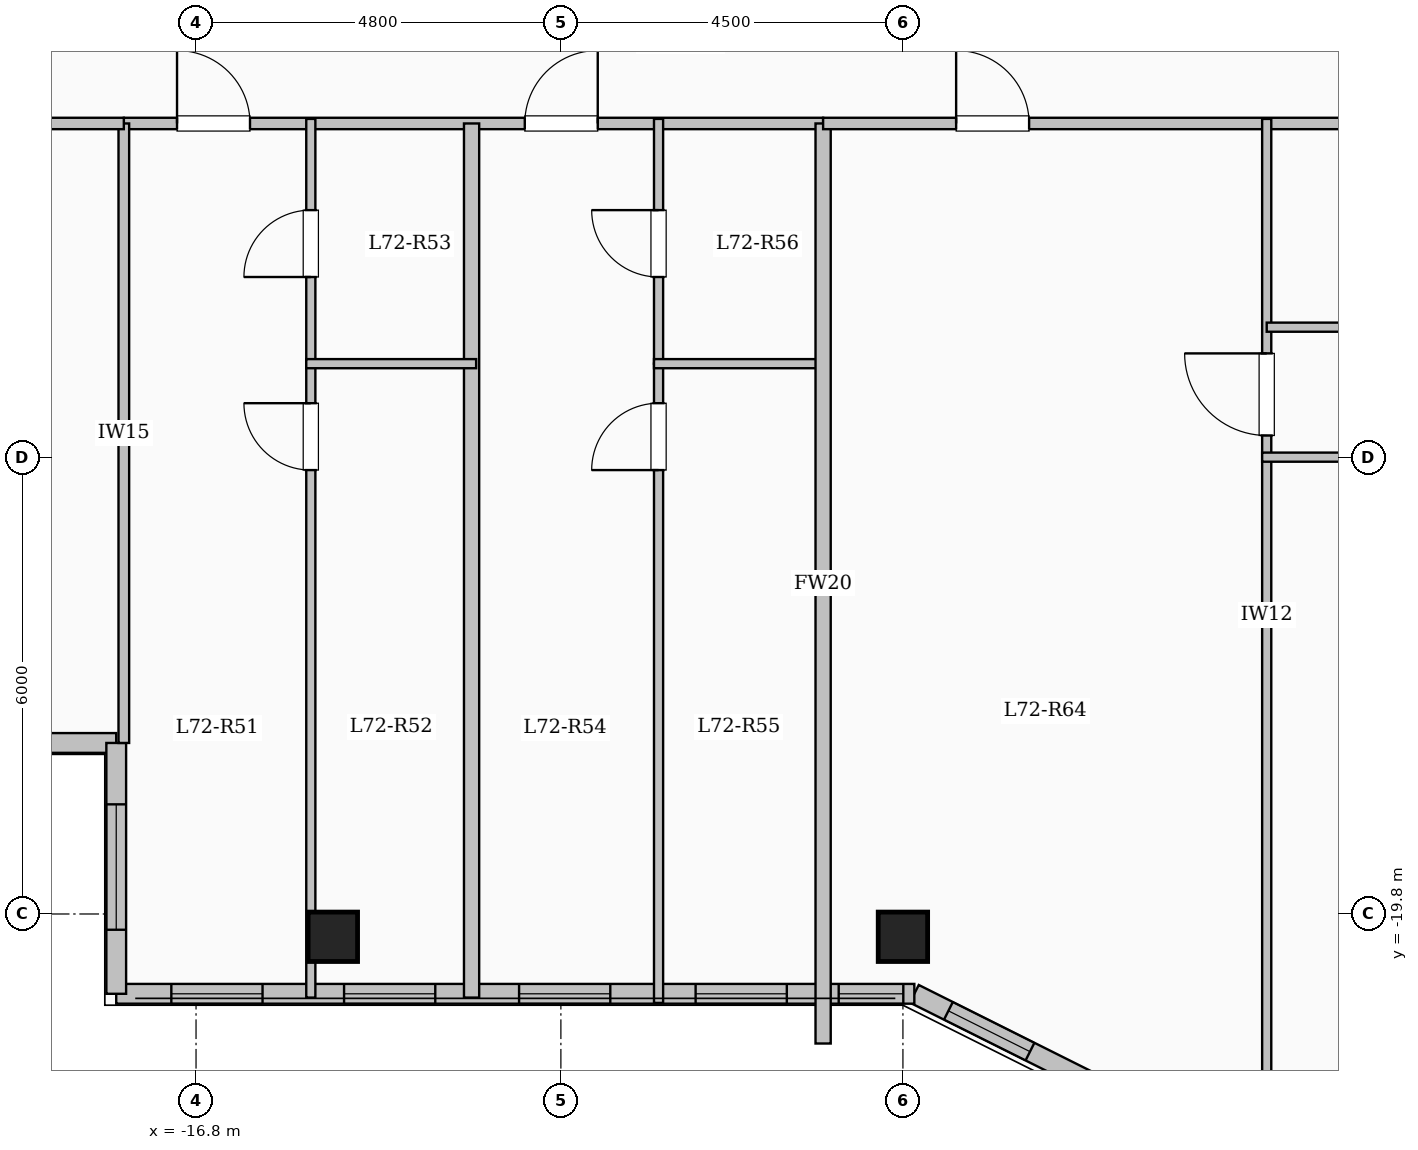
"""IFC4 building model, lengths in metres.
Left out: names, types, materials, properties, quantities, classifications, styles, units other than length and angle.
Written with IfcOpenShell. Run it as: python <this file> out.ifc"""

import sys

from ifc_helpers import new_model, si_unit, direction, frame, frame_2d, origin, origin_2d, place, context, subcontext, project, spatial, rectangle, extrude, element, fill, save


model = new_model("IFC4")
c1 = context("Model", 3, precision=1e-05, world=origin(), true_north=direction((0.0, 1.0)))
c2 = subcontext(c1, "Body", "Model", "MODEL_VIEW")
j1 = project(units=[si_unit("LENGTHUNIT", "METRE"), si_unit("PLANEANGLEUNIT", "RADIAN")], contexts=[c1])
p1 = place(None, origin())
s1 = spatial("IfcSite", under=j1, at=p1, CompositionType="ELEMENT")
p2 = place(p1, origin())
s2 = spatial("IfcBuilding", under=s1, at=p2, CompositionType="ELEMENT")
p3 = place(p2, frame((0.0, 0.0, 264.95)))
s3 = spatial("IfcBuildingStorey", under=s2, at=p3, CompositionType="ELEMENT", Elevation=264.95)
for number, where, z_axis, x_axis in (
    (1, (-15.0, -20.1, 0.0), (0.0, 0.0, 1.0), (1.0, 0.0, 0.0)),
    (2, (-7.5, -20.1, 0.0), (0.0, 0.0, 1.0), (1.0, 0.0, 0.0)),
):
    element("IfcColumn", number, at=place(p3, frame(where, z_axis=z_axis, x_axis=x_axis)), inside=s3, PredefinedType="COLUMN", context=c2, shape_type="SweptSolid", body=[
        extrude(rectangle(XDim=0.65, YDim=0.65, at=origin_2d()), origin(), (0.0, 0.0, 1.0), 3.35),
    ])
p4 = place(p3, frame((-17.85, -17.55, 0.0), z_axis=(0.0, 0.0, 1.0), x_axis=(-1.0, 0.0, 0.0)))
e3 = element("IfcWall", 3, at=p4, inside=s3, PredefinedType="SOLIDWALL", context=c2, shape_type="SweptSolid", body=[
    extrude(rectangle(XDim=4.8, YDim=0.26, at=frame_2d((2.4, 0.0))), origin(), (0.0, 0.0, 1.0), 3.1),
])
p5 = place(p4, frame((1.275, 0.0, 0.9)))
e4 = element("IfcOpeningElement", 4, at=p5, cuts=e3, PredefinedType="OPENING", context=c2, shape_type="SweptSolid", body=[
    extrude(rectangle(XDim=2.2, YDim=1.75, at=frame_2d((1.1, 0.875))), frame((0.0, 0.14, 0.0), z_axis=(0.0, -1.0, 0.0), x_axis=(1.0, 0.0, 0.0)), (0.0, 0.0, 1.0), 0.28),
])
p6 = place(p3, frame((-4.35, -22.35, 0.0), z_axis=(0.0, 0.0, 1.0), x_axis=(-0.894427191, 0.4472135955, 0.0)))
e5 = element("IfcWall", 5, at=p6, inside=s3, PredefinedType="SOLIDWALL", context=c2, shape_type="SweptSolid", body=[
    extrude(rectangle(XDim=3.354, YDim=0.26, at=frame_2d((1.677, 0.0))), origin(), (0.0, 0.0, 1.0), 3.1),
])
p7 = place(p6, frame((1.653, 0.0, 0.95)))
e6 = element("IfcOpeningElement", 6, at=p7, cuts=e5, PredefinedType="OPENING", context=c2, shape_type="SweptSolid", body=[
    extrude(rectangle(XDim=1.2, YDim=1.5, at=frame_2d((0.6, 0.75))), frame((0.0, 0.14, 0.0), z_axis=(0.0, -1.0, 0.0), x_axis=(1.0, 0.0, 0.0)), (0.0, 0.0, 1.0), 0.28),
])
p8 = place(p3, frame((-7.35, -20.85, 0.0), z_axis=(0.0, 0.0, 1.0), x_axis=(-1.0, 0.0, 0.0)))
e7 = element("IfcWall", 7, at=p8, inside=s3, PredefinedType="SOLIDWALL", context=c2, shape_type="SweptSolid", body=[
    extrude(rectangle(XDim=10.5, YDim=0.26, at=frame_2d((5.25, 0.0))), origin(), (0.0, 0.0, 1.0), 3.1),
])
p9 = place(p8, frame((0.145, 0.0, 0.95)))
e8 = element("IfcOpeningElement", 8, at=p9, cuts=e7, PredefinedType="OPENING", context=c2, shape_type="SweptSolid", body=[
    extrude(rectangle(XDim=0.85, YDim=1.5, at=frame_2d((0.425, 0.75))), frame((0.0, 0.14, 0.0), z_axis=(0.0, -1.0, 0.0), x_axis=(1.0, 0.0, 0.0)), (0.0, 0.0, 1.0), 0.28),
])
p10 = place(p8, frame((1.677, 0.0, 0.95)))
e9 = element("IfcOpeningElement", 9, at=p10, cuts=e7, PredefinedType="OPENING", context=c2, shape_type="SweptSolid", body=[
    extrude(rectangle(XDim=1.2, YDim=1.5, at=frame_2d((0.6, 0.75))), frame((0.0, 0.14, 0.0), z_axis=(0.0, -1.0, 0.0), x_axis=(1.0, 0.0, 0.0)), (0.0, 0.0, 1.0), 0.28),
])
p11 = place(p8, frame((4.0, 0.0, 0.95)))
e10 = element("IfcOpeningElement", 10, at=p11, cuts=e7, PredefinedType="OPENING", context=c2, shape_type="SweptSolid", body=[
    extrude(rectangle(XDim=1.2, YDim=1.5, at=frame_2d((0.6, 0.75))), frame((0.0, 0.14, 0.0), z_axis=(0.0, -1.0, 0.0), x_axis=(1.0, 0.0, 0.0)), (0.0, 0.0, 1.0), 0.28),
])
p12 = place(p8, frame((6.302, 0.0, 0.95)))
e11 = element("IfcOpeningElement", 11, at=p12, cuts=e7, PredefinedType="OPENING", context=c2, shape_type="SweptSolid", body=[
    extrude(rectangle(XDim=1.2, YDim=1.5, at=frame_2d((0.6, 0.75))), frame((0.0, 0.14, 0.0), z_axis=(0.0, -1.0, 0.0), x_axis=(1.0, 0.0, 0.0)), (0.0, 0.0, 1.0), 0.28),
])
p13 = place(p8, frame((8.575, 0.0, 0.95)))
e12 = element("IfcOpeningElement", 12, at=p13, cuts=e7, PredefinedType="OPENING", context=c2, shape_type="SweptSolid", body=[
    extrude(rectangle(XDim=1.2, YDim=1.5, at=frame_2d((0.6, 0.75))), frame((0.0, 0.14, 0.0), z_axis=(0.0, -1.0, 0.0), x_axis=(1.0, 0.0, 0.0)), (0.0, 0.0, 1.0), 0.28),
])
p14 = place(p3, frame((-17.85, -20.85, 0.0), z_axis=(0.0, 0.0, 1.0), x_axis=(0.0, 1.0, 0.0)))
e13 = element("IfcWall", 13, at=p14, inside=s3, PredefinedType="SOLIDWALL", context=c2, shape_type="SweptSolid", body=[
    extrude(rectangle(XDim=3.3, YDim=0.26, at=frame_2d((1.65, 0.0))), origin(), (0.0, 0.0, 1.0), 3.1),
])
p15 = place(p14, frame((0.843, 0.0, 0.9)))
e14 = element("IfcOpeningElement", 14, at=p15, cuts=e13, PredefinedType="OPENING", context=c2, shape_type="SweptSolid", body=[
    extrude(rectangle(XDim=1.65, YDim=1.6, at=frame_2d((0.825, 0.8))), frame((0.0, 0.14, 0.0), z_axis=(0.0, -1.0, 0.0), x_axis=(1.0, 0.0, 0.0)), (0.0, 0.0, 1.0), 0.28),
])
p16 = place(p3, frame((-17.75, -9.4, 0.0), z_axis=(0.0, 0.0, 1.0), x_axis=(1.0, 0.0, 0.0)))
e15 = element("IfcWall", 15, at=p16, inside=s3, PredefinedType="PARTITIONING", context=c2, shape_type="SweptSolid", body=[
    extrude(rectangle(XDim=9.2, YDim=0.15, at=frame_2d((4.6, 0.0))), origin(), (0.0, 0.0, 1.0), 3.1),
])
p17 = place(p16, frame((0.7, 0.0, 0.0)))
e16 = element("IfcOpeningElement", 16, at=p17, cuts=e15, PredefinedType="OPENING", context=c2, shape_type="SweptSolid", body=[
    extrude(rectangle(XDim=0.96, YDim=2.15, at=frame_2d((0.48, 1.075))), frame((0.0, 0.085, 0.0), z_axis=(0.0, -1.0, 0.0), x_axis=(1.0, 0.0, 0.0)), (0.0, 0.0, 1.0), 0.17),
])
p18 = place(p16, frame((5.275, 0.0, 0.0)))
e17 = element("IfcOpeningElement", 17, at=p18, cuts=e15, PredefinedType="OPENING", context=c2, shape_type="SweptSolid", body=[
    extrude(rectangle(XDim=0.96, YDim=2.15, at=frame_2d((0.48, 1.075))), frame((0.0, 0.085, 0.0), z_axis=(0.0, -1.0, 0.0), x_axis=(1.0, 0.0, 0.0)), (0.0, 0.0, 1.0), 0.17),
])
p19 = place(p3, frame((-13.175, -20.9, 0.0), z_axis=(0.0, 0.0, 1.0), x_axis=(0.0, 1.0, 0.0)))
e18 = element("IfcWall", 18, at=p19, inside=s3, PredefinedType="SOLIDWALL", context=c2, shape_type="SweptSolid", body=[
    extrude(rectangle(XDim=11.5, YDim=0.2, at=frame_2d((5.75, 0.0))), origin(), (0.0, 0.0, 1.0), 3.1),
])
p20 = place(p3, frame((-15.29, -20.9, 0.0), z_axis=(0.0, 0.0, 1.0), x_axis=(0.0, 1.0, 0.0)))
e19 = element("IfcWall", 19, at=p20, inside=s3, PredefinedType="PARTITIONING", context=c2, shape_type="SweptSolid", body=[
    extrude(rectangle(XDim=8.34, YDim=0.12, at=frame_2d((4.17, 0.0))), origin(), (0.0, 0.0, 1.0), 2.685),
])
p21 = place(p20, frame((6.94, 0.0, 0.0)))
e20 = element("IfcOpeningElement", 20, at=p21, cuts=e19, PredefinedType="OPENING", context=c2, shape_type="SweptSolid", body=[
    extrude(rectangle(XDim=0.88, YDim=2.1, at=frame_2d((0.44, 1.05))), frame((0.0, 0.07, 0.0), z_axis=(0.0, -1.0, 0.0), x_axis=(1.0, 0.0, 0.0)), (0.0, 0.0, 1.0), 0.14),
])
p22 = place(p3, frame((-15.29, -12.56, 0.0), z_axis=(0.0, 0.0, 1.0), x_axis=(0.0, 1.0, 0.0)))
e21 = element("IfcWall", 21, at=p22, inside=s3, PredefinedType="PARTITIONING", context=c2, shape_type="SweptSolid", body=[
    extrude(rectangle(XDim=3.22, YDim=0.12, at=frame_2d((1.61, 0.0))), origin(), (0.0, 0.0, 1.0), 2.685),
])
p23 = place(p22, frame((1.14, 0.0, 0.0)))
e22 = element("IfcOpeningElement", 22, at=p23, cuts=e21, PredefinedType="OPENING", context=c2, shape_type="SweptSolid", body=[
    extrude(rectangle(XDim=0.88, YDim=2.1, at=frame_2d((0.44, 1.05))), frame((0.0, 0.07, 0.0), z_axis=(0.0, -1.0, 0.0), x_axis=(1.0, 0.0, 0.0)), (0.0, 0.0, 1.0), 0.14),
])
p24 = place(p3, frame((-15.35, -12.56, 0.0), z_axis=(0.0, 0.0, 1.0), x_axis=(1.0, 0.0, 0.0)))
e23 = element("IfcWall", 23, at=p24, inside=s3, PredefinedType="PARTITIONING", context=c2, shape_type="SweptSolid", body=[
    extrude(rectangle(XDim=2.235, YDim=0.12, at=frame_2d((1.118, 0.0))), origin(), (0.0, 0.0, 1.0), 2.785),
])
p25 = place(p3, frame((-10.715, -20.97, 0.0), z_axis=(0.0, 0.0, 1.0), x_axis=(0.0, 1.0, 0.0)))
e24 = element("IfcWall", 24, at=p25, inside=s3, PredefinedType="PARTITIONING", context=c2, shape_type="SweptSolid", body=[
    extrude(rectangle(XDim=8.41, YDim=0.12, at=frame_2d((4.205, 0.0))), origin(), (0.0, 0.0, 1.0), 3.1),
])
p26 = place(p25, frame((7.01, 0.0, 0.0)))
e25 = element("IfcOpeningElement", 25, at=p26, cuts=e24, PredefinedType="OPENING", context=c2, shape_type="SweptSolid", body=[
    extrude(rectangle(XDim=0.88, YDim=2.1, at=frame_2d((0.44, 1.05))), frame((0.0, 0.07, 0.0), z_axis=(0.0, -1.0, 0.0), x_axis=(1.0, 0.0, 0.0)), (0.0, 0.0, 1.0), 0.14),
])
p27 = place(p3, frame((-10.715, -12.56, 0.0), z_axis=(0.0, 0.0, 1.0), x_axis=(0.0, 1.0, 0.0)))
e26 = element("IfcWall", 26, at=p27, inside=s3, PredefinedType="PARTITIONING", context=c2, shape_type="SweptSolid", body=[
    extrude(rectangle(XDim=3.22, YDim=0.12, at=frame_2d((1.61, 0.0))), origin(), (0.0, 0.0, 1.0), 3.1),
])
p28 = place(p27, frame((1.14, 0.0, 0.0)))
e27 = element("IfcOpeningElement", 27, at=p28, cuts=e26, PredefinedType="OPENING", context=c2, shape_type="SweptSolid", body=[
    extrude(rectangle(XDim=0.88, YDim=2.1, at=frame_2d((0.44, 1.05))), frame((0.0, 0.07, 0.0), z_axis=(0.0, -1.0, 0.0), x_axis=(1.0, 0.0, 0.0)), (0.0, 0.0, 1.0), 0.14),
])
p29 = place(p3, frame((-10.775, -12.56, 0.0), z_axis=(0.0, 0.0, 1.0), x_axis=(1.0, 0.0, 0.0)))
e28 = element("IfcWall", 28, at=p29, inside=s3, PredefinedType="PARTITIONING", context=c2, shape_type="SweptSolid", body=[
    extrude(rectangle(XDim=2.235, YDim=0.12, at=frame_2d((1.117, 0.0))), origin(), (0.0, 0.0, 1.0), 2.785),
])
p30 = place(p3, frame((-8.55, -21.504, 0.0), z_axis=(0.0, 0.0, 1.0), x_axis=(0.0, 1.0, 0.0)))
e29 = element("IfcWall", 29, at=p30, inside=s3, PredefinedType="SOLIDWALL", context=c2, shape_type="SweptSolid", body=[
    extrude(rectangle(XDim=12.104, YDim=0.2, at=frame_2d((6.052, 0.0))), origin(), (0.0, 0.0, 1.0), 3.1),
])
p31 = place(p3, frame((-8.55, -9.4, 0.0), z_axis=(0.0, 0.0, 1.0), x_axis=(1.0, 0.0, 0.0)))
e30 = element("IfcWall", 30, at=p31, inside=s3, PredefinedType="PARTITIONING", context=c2, shape_type="SweptSolid", body=[
    extrude(rectangle(XDim=17.1, YDim=0.15, at=frame_2d((8.55, 0.0))), origin(), (0.0, 0.0, 1.0), 3.1),
])
p32 = place(p31, frame((1.75, 0.0, 0.0)))
e31 = element("IfcOpeningElement", 31, at=p32, cuts=e30, PredefinedType="OPENING", context=c2, shape_type="SweptSolid", body=[
    extrude(rectangle(XDim=0.96, YDim=2.15, at=frame_2d((0.48, 1.075))), frame((0.0, 0.085, 0.0), z_axis=(0.0, -1.0, 0.0), x_axis=(1.0, 0.0, 0.0)), (0.0, 0.0, 1.0), 0.17),
])
p33 = place(p3, frame((-2.714, -22.38, 0.0), z_axis=(0.0, 0.0, 1.0), x_axis=(0.0, 1.0, 0.0)))
e32 = element("IfcWall", 32, at=p33, inside=s3, PredefinedType="PARTITIONING", context=c2, shape_type="SweptSolid", body=[
    extrude(rectangle(XDim=13.04, YDim=0.12, at=frame_2d((6.52, 0.0))), origin(), (0.0, 0.0, 1.0), 3.1),
])
p34 = place(p33, frame((8.875, 0.0, 0.0)))
e33 = element("IfcOpeningElement", 33, at=p34, cuts=e32, PredefinedType="OPENING", context=c2, shape_type="SweptSolid", body=[
    extrude(rectangle(XDim=1.08, YDim=2.15, at=frame_2d((0.54, 1.075))), frame((0.0, 0.07, 0.0), z_axis=(0.0, -1.0, 0.0), x_axis=(1.0, 0.0, 0.0)), (0.0, 0.0, 1.0), 0.14),
])
p35 = place(p3, frame((-2.714, -12.08, 0.0), z_axis=(0.0, 0.0, 1.0), x_axis=(1.0, 0.0, 0.0)))
e34 = element("IfcWall", 34, at=p35, inside=s3, PredefinedType="PARTITIONING", context=c2, shape_type="SweptSolid", body=[
    extrude(rectangle(XDim=5.933, YDim=0.12, at=frame_2d((2.967, 0.0))), origin(), (0.0, 0.0, 1.0), 2.785),
])
p36 = place(p35, frame((2.526, 0.0, 0.0)))
e35 = element("IfcOpeningElement", 35, at=p36, cuts=e34, PredefinedType="OPENING", context=c2, shape_type="SweptSolid", body=[
    extrude(rectangle(XDim=0.88, YDim=2.1, at=frame_2d((0.44, 1.05))), frame((0.0, 0.07, 0.0), z_axis=(0.0, -1.0, 0.0), x_axis=(1.0, 0.0, 0.0)), (0.0, 0.0, 1.0), 0.14),
])
p37 = place(p3, frame((-2.774, -13.79, 0.0), z_axis=(0.0, 0.0, 1.0), x_axis=(1.0, 0.0, 0.0)))
e36 = element("IfcWall", 36, at=p37, inside=s3, PredefinedType="PARTITIONING", context=c2, shape_type="SweptSolid", body=[
    extrude(rectangle(XDim=11.384, YDim=0.12, at=frame_2d((5.692, 0.0))), origin(), (0.0, 0.0, 1.0), 2.785),
])
p38 = place(p37, frame((1.426, 0.0, 0.0)))
e37 = element("IfcOpeningElement", 37, at=p38, cuts=e36, PredefinedType="OPENING", context=c2, shape_type="SweptSolid", body=[
    extrude(rectangle(XDim=0.88, YDim=2.1, at=frame_2d((0.44, 1.05))), frame((0.0, 0.07, 0.0), z_axis=(0.0, -1.0, 0.0), x_axis=(1.0, 0.0, 0.0)), (0.0, 0.0, 1.0), 0.14),
])
p39 = place(p37, frame((5.157, 0.0, 0.0)))
e38 = element("IfcOpeningElement", 38, at=p39, cuts=e36, PredefinedType="OPENING", context=c2, shape_type="SweptSolid", body=[
    extrude(rectangle(XDim=0.88, YDim=2.1, at=frame_2d((0.44, 1.05))), frame((0.0, 0.07, 0.0), z_axis=(0.0, -1.0, 0.0), x_axis=(1.0, 0.0, 0.0)), (0.0, 0.0, 1.0), 0.14),
])
p40 = place(p37, frame((8.888, 0.0, 0.0)))
e39 = element("IfcOpeningElement", 39, at=p40, cuts=e36, PredefinedType="OPENING", context=c2, shape_type="SweptSolid", body=[
    extrude(rectangle(XDim=0.88, YDim=2.1, at=frame_2d((0.44, 1.05))), frame((0.0, 0.07, 0.0), z_axis=(0.0, -1.0, 0.0), x_axis=(1.0, 0.0, 0.0)), (0.0, 0.0, 1.0), 0.14),
])
p41 = place(p3, frame((-17.75, -17.55, 0.0), z_axis=(0.0, 0.0, 1.0), x_axis=(0.0, 1.0, 0.0)))
e40 = element("IfcWall", 40, at=p41, inside=s3, PredefinedType="PARTITIONING", context=c2, shape_type="SweptSolid", body=[
    extrude(rectangle(XDim=8.15, YDim=0.14, at=frame_2d((4.075, 0.0))), origin(), (0.0, 0.0, 1.0), 3.1),
])
p42 = place(p3, frame((-22.68, -9.4, 0.0), z_axis=(0.0, 0.0, 1.0), x_axis=(1.0, 0.0, 0.0)))
e41 = element("IfcWall", 41, at=p42, inside=s3, PredefinedType="PARTITIONING", context=c2, shape_type="SweptSolid", body=[
    extrude(rectangle(XDim=4.93, YDim=0.15, at=frame_2d((2.465, 0.0))), origin(), (0.0, 0.0, 1.0), 3.1),
])
p43 = place(p42, frame((1.99, 0.0, 0.0)))
e42 = element("IfcOpeningElement", 42, at=p43, cuts=e41, PredefinedType="OPENING", context=c2, shape_type="SweptSolid", body=[
    extrude(rectangle(XDim=0.95, YDim=2.15, at=frame_2d((0.475, 1.075))), frame((0.0, 0.085, 0.0), z_axis=(0.0, -1.0, 0.0), x_axis=(1.0, 0.0, 0.0)), (0.0, 0.0, 1.0), 0.17),
])
p44 = place(p7, origin())
e43 = element("IfcWindow", 43, at=p44, inside=s3, PartitioningType="SINGLE_PANEL", PredefinedType="WINDOW", context=c2, shape_type="SweptSolid", body=[
    extrude(rectangle(XDim=1.2, YDim=1.5, at=frame_2d((0.6, 0.75))), frame((0.0, 0.03, 0.0), z_axis=(0.0, -1.0, 0.0), x_axis=(1.0, 0.0, 0.0)), (0.0, 0.0, 1.0), 0.06),
])
fill(e6, e43)
p45 = place(p9, origin())
e44 = element("IfcWindow", 44, at=p45, inside=s3, PartitioningType="SINGLE_PANEL", PredefinedType="WINDOW", context=c2, shape_type="SweptSolid", body=[
    extrude(rectangle(XDim=0.85, YDim=1.5, at=frame_2d((0.425, 0.75))), frame((0.0, 0.03, 0.0), z_axis=(0.0, -1.0, 0.0), x_axis=(1.0, 0.0, 0.0)), (0.0, 0.0, 1.0), 0.06),
])
fill(e8, e44)
p46 = place(p10, origin())
e45 = element("IfcWindow", 45, at=p46, inside=s3, PartitioningType="SINGLE_PANEL", PredefinedType="WINDOW", context=c2, shape_type="SweptSolid", body=[
    extrude(rectangle(XDim=1.2, YDim=1.5, at=frame_2d((0.6, 0.75))), frame((0.0, 0.03, 0.0), z_axis=(0.0, -1.0, 0.0), x_axis=(1.0, 0.0, 0.0)), (0.0, 0.0, 1.0), 0.06),
])
fill(e9, e45)
p47 = place(p11, origin())
e46 = element("IfcWindow", 46, at=p47, inside=s3, PartitioningType="SINGLE_PANEL", PredefinedType="WINDOW", context=c2, shape_type="SweptSolid", body=[
    extrude(rectangle(XDim=1.2, YDim=1.5, at=frame_2d((0.6, 0.75))), frame((0.0, 0.03, 0.0), z_axis=(0.0, -1.0, 0.0), x_axis=(1.0, 0.0, 0.0)), (0.0, 0.0, 1.0), 0.06),
])
fill(e10, e46)
p48 = place(p12, origin())
e47 = element("IfcWindow", 47, at=p48, inside=s3, PartitioningType="SINGLE_PANEL", PredefinedType="WINDOW", context=c2, shape_type="SweptSolid", body=[
    extrude(rectangle(XDim=1.2, YDim=1.5, at=frame_2d((0.6, 0.75))), frame((0.0, 0.03, 0.0), z_axis=(0.0, -1.0, 0.0), x_axis=(1.0, 0.0, 0.0)), (0.0, 0.0, 1.0), 0.06),
])
fill(e11, e47)
p49 = place(p13, origin())
e48 = element("IfcWindow", 48, at=p49, inside=s3, PartitioningType="SINGLE_PANEL", PredefinedType="WINDOW", context=c2, shape_type="SweptSolid", body=[
    extrude(rectangle(XDim=1.2, YDim=1.5, at=frame_2d((0.6, 0.75))), frame((0.0, 0.03, 0.0), z_axis=(0.0, -1.0, 0.0), x_axis=(1.0, 0.0, 0.0)), (0.0, 0.0, 1.0), 0.06),
])
fill(e12, e48)
p50 = place(p15, origin())
e49 = element("IfcWindow", 49, at=p50, inside=s3, PartitioningType="SINGLE_PANEL", PredefinedType="WINDOW", context=c2, shape_type="SweptSolid", body=[
    extrude(rectangle(XDim=1.65, YDim=1.6, at=frame_2d((0.825, 0.8))), frame((0.0, 0.03, 0.0), z_axis=(0.0, -1.0, 0.0), x_axis=(1.0, 0.0, 0.0)), (0.0, 0.0, 1.0), 0.06),
])
fill(e14, e49)
p51 = place(p17, origin())
e50 = element("IfcDoor", 50, at=p51, inside=s3, OperationType="SINGLE_SWING_LEFT", PredefinedType="DOOR", context=c2, shape_type="SweptSolid", body=[
    extrude(rectangle(XDim=0.96, YDim=2.15, at=frame_2d((0.48, 1.075))), frame((0.0, 0.025, 0.0), z_axis=(0.0, -1.0, 0.0), x_axis=(1.0, 0.0, 0.0)), (0.0, 0.0, 1.0), 0.05),
])
fill(e16, e50)
p52 = place(p21, origin())
e51 = element("IfcDoor", 51, at=p52, inside=s3, OperationType="SINGLE_SWING_RIGHT", PredefinedType="DOOR", context=c2, shape_type="SweptSolid", body=[
    extrude(rectangle(XDim=0.88, YDim=2.1, at=frame_2d((0.44, 1.05))), frame((0.0, 0.025, 0.0), z_axis=(0.0, -1.0, 0.0), x_axis=(1.0, 0.0, 0.0)), (0.0, 0.0, 1.0), 0.05),
])
fill(e20, e51)
p53 = place(p23, origin())
e52 = element("IfcDoor", 52, at=p53, inside=s3, OperationType="SINGLE_SWING_LEFT", PredefinedType="DOOR", context=c2, shape_type="SweptSolid", body=[
    extrude(rectangle(XDim=0.88, YDim=2.1, at=frame_2d((0.44, 1.05))), frame((0.0, 0.025, 0.0), z_axis=(0.0, -1.0, 0.0), x_axis=(1.0, 0.0, 0.0)), (0.0, 0.0, 1.0), 0.05),
])
fill(e22, e52)
p54 = place(p18, origin())
e53 = element("IfcDoor", 53, at=p54, inside=s3, OperationType="SINGLE_SWING_RIGHT", PredefinedType="DOOR", context=c2, shape_type="SweptSolid", body=[
    extrude(rectangle(XDim=0.96, YDim=2.15, at=frame_2d((0.48, 1.075))), frame((0.0, 0.025, 0.0), z_axis=(0.0, -1.0, 0.0), x_axis=(1.0, 0.0, 0.0)), (0.0, 0.0, 1.0), 0.05),
])
fill(e17, e53)
p55 = place(p26, origin())
e54 = element("IfcDoor", 54, at=p55, inside=s3, OperationType="SINGLE_SWING_LEFT", PredefinedType="DOOR", context=c2, shape_type="SweptSolid", body=[
    extrude(rectangle(XDim=0.88, YDim=2.1, at=frame_2d((0.44, 1.05))), frame((0.0, 0.025, 0.0), z_axis=(0.0, -1.0, 0.0), x_axis=(1.0, 0.0, 0.0)), (0.0, 0.0, 1.0), 0.05),
])
fill(e25, e54)
p56 = place(p28, origin())
e55 = element("IfcDoor", 55, at=p56, inside=s3, OperationType="SINGLE_SWING_RIGHT", PredefinedType="DOOR", context=c2, shape_type="SweptSolid", body=[
    extrude(rectangle(XDim=0.88, YDim=2.1, at=frame_2d((0.44, 1.05))), frame((0.0, 0.025, 0.0), z_axis=(0.0, -1.0, 0.0), x_axis=(1.0, 0.0, 0.0)), (0.0, 0.0, 1.0), 0.05),
])
fill(e27, e55)
p57 = place(p32, origin())
e56 = element("IfcDoor", 56, at=p57, inside=s3, OperationType="SINGLE_SWING_LEFT", PredefinedType="DOOR", context=c2, shape_type="SweptSolid", body=[
    extrude(rectangle(XDim=0.96, YDim=2.15, at=frame_2d((0.48, 1.075))), frame((0.0, 0.025, 0.0), z_axis=(0.0, -1.0, 0.0), x_axis=(1.0, 0.0, 0.0)), (0.0, 0.0, 1.0), 0.05),
])
fill(e31, e56)
p58 = place(p34, origin())
e57 = element("IfcDoor", 57, at=p58, inside=s3, OperationType="SINGLE_SWING_RIGHT", PredefinedType="DOOR", context=c2, shape_type="SweptSolid", body=[
    extrude(rectangle(XDim=1.08, YDim=2.15, at=frame_2d((0.54, 1.075))), frame((0.0, 0.025, 0.0), z_axis=(0.0, -1.0, 0.0), x_axis=(1.0, 0.0, 0.0)), (0.0, 0.0, 1.0), 0.05),
])
fill(e33, e57)
save(model, sys.argv[1])
